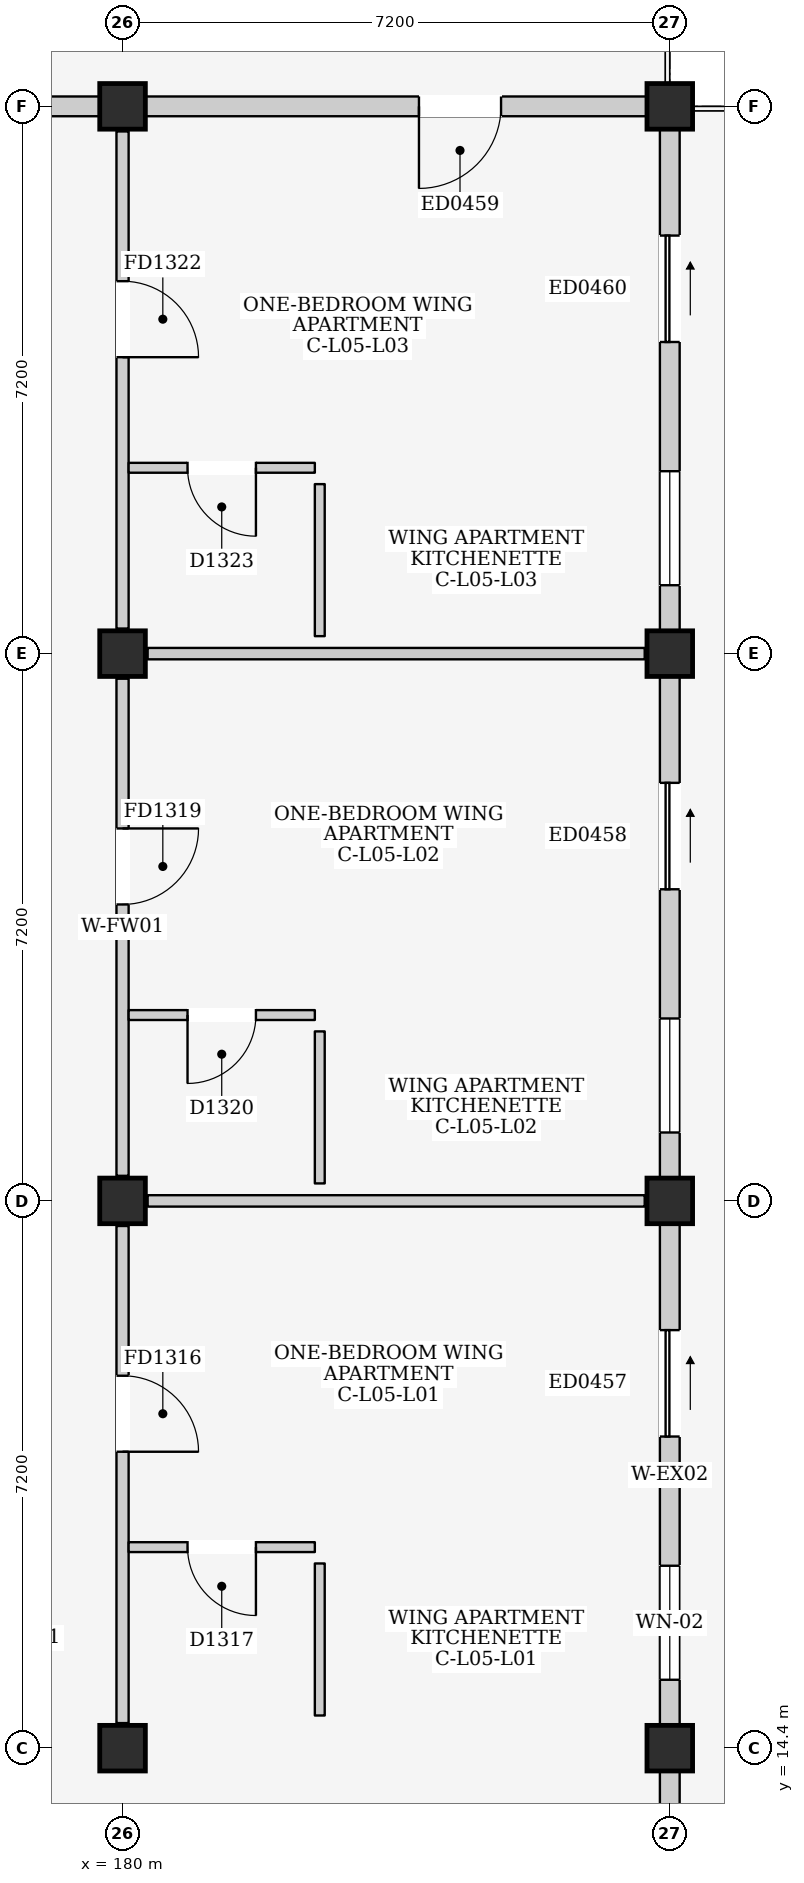
"""IFC4 building model, lengths in metres.
Left out: names, types, materials, properties, quantities, classifications, styles, units other than length and angle.
Written with IfcOpenShell. Run it as: python <this file> out.ifc"""

import sys

from ifc_helpers import new_model, si_unit, direction, frame, frame_2d, origin, origin_2d, place, context, subcontext, project, spatial, rectangle, extrude, element, fill, save


model = new_model("IFC4")
c1 = context("Model", 3, precision=1e-05, world=origin(), true_north=direction((0.0, 1.0)))
c2 = subcontext(c1, "Body", "Model", "MODEL_VIEW")
j1 = project(units=[si_unit("LENGTHUNIT", "METRE"), si_unit("PLANEANGLEUNIT", "RADIAN")], contexts=[c1])
p1 = place(None, origin())
s1 = spatial("IfcSite", under=j1, at=p1, CompositionType="ELEMENT")
p2 = place(p1, origin())
s2 = spatial("IfcBuilding", under=s1, at=p2, CompositionType="ELEMENT")
p3 = place(p2, frame((0.0, 0.0, 18.6)))
s3 = spatial("IfcBuildingStorey", under=s2, at=p3, CompositionType="ELEMENT", Elevation=18.6)
for number, where, z_axis, x_axis in (
    (1, (180.0, 14.4, 0.0), (0.0, 0.0, 1.0), (1.0, 0.0, 0.0)),
    (2, (180.0, 21.6, 0.0), (0.0, 0.0, 1.0), (1.0, 0.0, 0.0)),
    (3, (180.0, 28.8, 0.0), (0.0, 0.0, 1.0), (1.0, 0.0, 0.0)),
    (4, (180.0, 36.0, 0.0), (0.0, 0.0, 1.0), (1.0, 0.0, 0.0)),
    (5, (187.2, 14.4, 0.0), (0.0, 0.0, 1.0), (1.0, 0.0, 0.0)),
    (6, (187.2, 21.6, 0.0), (0.0, 0.0, 1.0), (1.0, 0.0, 0.0)),
    (7, (187.2, 28.8, 0.0), (0.0, 0.0, 1.0), (1.0, 0.0, 0.0)),
    (8, (187.2, 36.0, 0.0), (0.0, 0.0, 1.0), (1.0, 0.0, 0.0)),
):
    element("IfcColumn", number, at=place(p3, frame(where, z_axis=z_axis, x_axis=x_axis)), inside=s3, PredefinedType="COLUMN", context=c2, shape_type="SweptSolid", body=[
        extrude(rectangle(XDim=0.6, YDim=0.6, at=origin_2d()), origin(), (0.0, 0.0, 1.0), 3.3),
    ])
p4 = place(p3, frame((173.1, 36.0, 0.0), z_axis=(0.0, 0.0, 1.0), x_axis=(1.0, 0.0, 0.0)))
e9 = element("IfcWall", 9, at=p4, inside=s3, PredefinedType="ELEMENTEDWALL", context=c2, shape_type="SweptSolid", body=[
    extrude(rectangle(XDim=6.6, YDim=0.26, at=frame_2d((3.3, 0.0))), origin(), (0.0, 0.0, 1.0), 2.445),
])
p5 = place(p4, frame((2.8, 0.0, 1.1)))
e10 = element("IfcOpeningElement", 10, at=p5, cuts=e9, PredefinedType="OPENING", context=c2, shape_type="SweptSolid", body=[
    extrude(rectangle(XDim=1.0, YDim=0.9, at=frame_2d((0.5, 0.45))), frame((0.0, 0.145, 0.0), z_axis=(0.0, -1.0, 0.0), x_axis=(1.0, 0.0, 0.0)), (0.0, 0.0, 1.0), 0.29),
])
p6 = place(p3, frame((187.2, 7.5, 0.0), z_axis=(0.0, 0.0, 1.0), x_axis=(0.0, 1.0, 0.0)))
e11 = element("IfcWall", 11, at=p6, inside=s3, PredefinedType="ELEMENTEDWALL", context=c2, shape_type="SweptSolid", body=[
    extrude(rectangle(XDim=6.6, YDim=0.26, at=frame_2d((3.3, 0.0))), origin(), (0.0, 0.0, 1.0), 2.595),
])
p7 = place(p6, frame((3.65, 0.0, 0.0)))
e12 = element("IfcOpeningElement", 12, at=p7, cuts=e11, PredefinedType="OPENING", context=c2, shape_type="SweptSolid", body=[
    extrude(rectangle(XDim=1.4, YDim=2.1, at=frame_2d((0.7, 1.05))), frame((0.0, 0.145, 0.0), z_axis=(0.0, -1.0, 0.0), x_axis=(1.0, 0.0, 0.0)), (0.0, 0.0, 1.0), 0.29),
])
p8 = place(p3, frame((187.2, 14.7, 0.0), z_axis=(0.0, 0.0, 1.0), x_axis=(0.0, 1.0, 0.0)))
e13 = element("IfcWall", 13, at=p8, inside=s3, PredefinedType="ELEMENTEDWALL", context=c2, shape_type="SweptSolid", body=[
    extrude(rectangle(XDim=6.6, YDim=0.26, at=frame_2d((3.3, 0.0))), origin(), (0.0, 0.0, 1.0), 2.595),
])
p9 = place(p8, frame((3.8, 0.0, 0.0)))
e14 = element("IfcOpeningElement", 14, at=p9, cuts=e13, PredefinedType="OPENING", context=c2, shape_type="SweptSolid", body=[
    extrude(rectangle(XDim=1.4, YDim=2.1, at=frame_2d((0.7, 1.05))), frame((0.0, 0.145, 0.0), z_axis=(0.0, -1.0, 0.0), x_axis=(1.0, 0.0, 0.0)), (0.0, 0.0, 1.0), 0.29),
])
p10 = place(p8, frame((0.6, 0.0, 0.95)))
e15 = element("IfcOpeningElement", 15, at=p10, cuts=e13, PredefinedType="OPENING", context=c2, shape_type="SweptSolid", body=[
    extrude(rectangle(XDim=1.5, YDim=1.5, at=frame_2d((0.75, 0.75))), frame((0.0, 0.145, 0.0), z_axis=(0.0, -1.0, 0.0), x_axis=(1.0, 0.0, 0.0)), (0.0, 0.0, 1.0), 0.29),
])
p11 = place(p3, frame((187.2, 21.9, 0.0), z_axis=(0.0, 0.0, 1.0), x_axis=(0.0, 1.0, 0.0)))
e16 = element("IfcWall", 16, at=p11, inside=s3, PredefinedType="ELEMENTEDWALL", context=c2, shape_type="SweptSolid", body=[
    extrude(rectangle(XDim=6.6, YDim=0.26, at=frame_2d((3.3, 0.0))), origin(), (0.0, 0.0, 1.0), 2.595),
])
p12 = place(p11, frame((3.8, 0.0, 0.0)))
e17 = element("IfcOpeningElement", 17, at=p12, cuts=e16, PredefinedType="OPENING", context=c2, shape_type="SweptSolid", body=[
    extrude(rectangle(XDim=1.4, YDim=2.1, at=frame_2d((0.7, 1.05))), frame((0.0, 0.145, 0.0), z_axis=(0.0, -1.0, 0.0), x_axis=(1.0, 0.0, 0.0)), (0.0, 0.0, 1.0), 0.29),
])
p13 = place(p11, frame((0.6, 0.0, 0.95)))
e18 = element("IfcOpeningElement", 18, at=p13, cuts=e16, PredefinedType="OPENING", context=c2, shape_type="SweptSolid", body=[
    extrude(rectangle(XDim=1.5, YDim=1.5, at=frame_2d((0.75, 0.75))), frame((0.0, 0.145, 0.0), z_axis=(0.0, -1.0, 0.0), x_axis=(1.0, 0.0, 0.0)), (0.0, 0.0, 1.0), 0.29),
])
p14 = place(p3, frame((180.3, 36.0, 0.0), z_axis=(0.0, 0.0, 1.0), x_axis=(1.0, 0.0, 0.0)))
e19 = element("IfcWall", 19, at=p14, inside=s3, PredefinedType="ELEMENTEDWALL", context=c2, shape_type="SweptSolid", body=[
    extrude(rectangle(XDim=6.6, YDim=0.26, at=frame_2d((3.3, 0.0))), origin(), (0.0, 0.0, 1.0), 2.445),
])
p15 = place(p14, frame((3.6, 0.0, 0.0)))
e20 = element("IfcOpeningElement", 20, at=p15, cuts=e19, PredefinedType="OPENING", context=c2, shape_type="SweptSolid", body=[
    extrude(rectangle(XDim=1.08, YDim=2.12, at=frame_2d((0.54, 1.06))), frame((0.0, 0.145, 0.0), z_axis=(0.0, -1.0, 0.0), x_axis=(1.0, 0.0, 0.0)), (0.0, 0.0, 1.0), 0.29),
])
p16 = place(p3, frame((187.2, 29.1, 0.0), z_axis=(0.0, 0.0, 1.0), x_axis=(0.0, 1.0, 0.0)))
e21 = element("IfcWall", 21, at=p16, inside=s3, PredefinedType="ELEMENTEDWALL", context=c2, shape_type="SweptSolid", body=[
    extrude(rectangle(XDim=6.6, YDim=0.26, at=frame_2d((3.3, 0.0))), origin(), (0.0, 0.0, 1.0), 2.595),
])
p17 = place(p16, frame((3.8, 0.0, 0.0)))
e22 = element("IfcOpeningElement", 22, at=p17, cuts=e21, PredefinedType="OPENING", context=c2, shape_type="SweptSolid", body=[
    extrude(rectangle(XDim=1.4, YDim=2.1, at=frame_2d((0.7, 1.05))), frame((0.0, 0.145, 0.0), z_axis=(0.0, -1.0, 0.0), x_axis=(1.0, 0.0, 0.0)), (0.0, 0.0, 1.0), 0.29),
])
p18 = place(p16, frame((0.6, 0.0, 0.95)))
e23 = element("IfcOpeningElement", 23, at=p18, cuts=e21, PredefinedType="OPENING", context=c2, shape_type="SweptSolid", body=[
    extrude(rectangle(XDim=1.5, YDim=1.5, at=frame_2d((0.75, 0.75))), frame((0.0, 0.145, 0.0), z_axis=(0.0, -1.0, 0.0), x_axis=(1.0, 0.0, 0.0)), (0.0, 0.0, 1.0), 0.29),
])
p19 = place(p3, frame((180.0, 14.73, 0.0), z_axis=(0.0, 0.0, 1.0), x_axis=(0.0, 1.0, 0.0)))
e24 = element("IfcWall", 24, at=p19, inside=s3, PredefinedType="PARTITIONING", context=c2, shape_type="SweptSolid", body=[
    extrude(rectangle(XDim=6.54, YDim=0.16, at=frame_2d((3.27, 0.0))), origin(), (0.0, 0.0, 1.0), 2.545),
])
p20 = place(p19, frame((3.57, 0.0, 0.0)))
e25 = element("IfcOpeningElement", 25, at=p20, cuts=e24, PredefinedType="OPENING", context=c2, shape_type="SweptSolid", body=[
    extrude(rectangle(XDim=1.0, YDim=2.15, at=frame_2d((0.5, 1.075))), frame((0.0, 0.095, 0.0), z_axis=(0.0, -1.0, 0.0), x_axis=(1.0, 0.0, 0.0)), (0.0, 0.0, 1.0), 0.19),
])
p21 = place(p3, frame((180.33, 21.6, 0.0), z_axis=(0.0, 0.0, 1.0), x_axis=(1.0, 0.0, 0.0)))
e26 = element("IfcWall", 26, at=p21, inside=s3, PredefinedType="PARTITIONING", context=c2, shape_type="SweptSolid", body=[
    extrude(rectangle(XDim=6.54, YDim=0.15, at=frame_2d((3.27, 0.0))), origin(), (0.0, 0.0, 1.0), 2.445),
])
p22 = place(p3, frame((180.08, 17.045, 0.0), z_axis=(0.0, 0.0, 1.0), x_axis=(1.0, 0.0, 0.0)))
e27 = element("IfcWall", 27, at=p22, inside=s3, PredefinedType="PARTITIONING", context=c2, shape_type="SweptSolid", body=[
    extrude(rectangle(XDim=2.45, YDim=0.13, at=frame_2d((1.225, 0.0))), origin(), (0.0, 0.0, 1.0), 3.06),
])
p23 = place(p22, frame((0.775, 0.0, 0.0)))
e28 = element("IfcOpeningElement", 28, at=p23, cuts=e27, PredefinedType="OPENING", context=c2, shape_type="SweptSolid", body=[
    extrude(rectangle(XDim=0.9, YDim=2.1, at=frame_2d((0.45, 1.05))), frame((0.0, 0.08, 0.0), z_axis=(0.0, -1.0, 0.0), x_axis=(1.0, 0.0, 0.0)), (0.0, 0.0, 1.0), 0.16),
])
p24 = place(p3, frame((182.595, 14.83, 0.0), z_axis=(0.0, 0.0, 1.0), x_axis=(0.0, 1.0, 0.0)))
e29 = element("IfcWall", 29, at=p24, inside=s3, PredefinedType="PARTITIONING", context=c2, shape_type="SweptSolid", body=[
    extrude(rectangle(XDim=2.0, YDim=0.13, at=frame_2d((1.0, 0.0))), origin(), (0.0, 0.0, 1.0), 3.06),
])
p25 = place(p3, frame((180.0, 21.93, 0.0), z_axis=(0.0, 0.0, 1.0), x_axis=(0.0, 1.0, 0.0)))
e30 = element("IfcWall", 30, at=p25, inside=s3, PredefinedType="PARTITIONING", context=c2, shape_type="SweptSolid", body=[
    extrude(rectangle(XDim=6.54, YDim=0.16, at=frame_2d((3.27, 0.0))), origin(), (0.0, 0.0, 1.0), 2.545),
])
p26 = place(p25, frame((3.57, 0.0, 0.0)))
e31 = element("IfcOpeningElement", 31, at=p26, cuts=e30, PredefinedType="OPENING", context=c2, shape_type="SweptSolid", body=[
    extrude(rectangle(XDim=1.0, YDim=2.15, at=frame_2d((0.5, 1.075))), frame((0.0, 0.095, 0.0), z_axis=(0.0, -1.0, 0.0), x_axis=(1.0, 0.0, 0.0)), (0.0, 0.0, 1.0), 0.19),
])
p27 = place(p3, frame((180.33, 28.8, 0.0), z_axis=(0.0, 0.0, 1.0), x_axis=(1.0, 0.0, 0.0)))
e32 = element("IfcWall", 32, at=p27, inside=s3, PredefinedType="PARTITIONING", context=c2, shape_type="SweptSolid", body=[
    extrude(rectangle(XDim=6.54, YDim=0.15, at=frame_2d((3.27, 0.0))), origin(), (0.0, 0.0, 1.0), 2.445),
])
p28 = place(p3, frame((180.08, 24.045, 0.0), z_axis=(0.0, 0.0, 1.0), x_axis=(1.0, 0.0, 0.0)))
e33 = element("IfcWall", 33, at=p28, inside=s3, PredefinedType="PARTITIONING", context=c2, shape_type="SweptSolid", body=[
    extrude(rectangle(XDim=2.45, YDim=0.13, at=frame_2d((1.225, 0.0))), origin(), (0.0, 0.0, 1.0), 3.06),
])
p29 = place(p28, frame((0.775, 0.0, 0.0)))
e34 = element("IfcOpeningElement", 34, at=p29, cuts=e33, PredefinedType="OPENING", context=c2, shape_type="SweptSolid", body=[
    extrude(rectangle(XDim=0.9, YDim=2.1, at=frame_2d((0.45, 1.05))), frame((0.0, 0.08, 0.0), z_axis=(0.0, -1.0, 0.0), x_axis=(1.0, 0.0, 0.0)), (0.0, 0.0, 1.0), 0.16),
])
p30 = place(p3, frame((182.595, 21.83, 0.0), z_axis=(0.0, 0.0, 1.0), x_axis=(0.0, 1.0, 0.0)))
e35 = element("IfcWall", 35, at=p30, inside=s3, PredefinedType="PARTITIONING", context=c2, shape_type="SweptSolid", body=[
    extrude(rectangle(XDim=2.0, YDim=0.13, at=frame_2d((1.0, 0.0))), origin(), (0.0, 0.0, 1.0), 3.06),
])
p31 = place(p3, frame((180.0, 29.13, 0.0), z_axis=(0.0, 0.0, 1.0), x_axis=(0.0, 1.0, 0.0)))
e36 = element("IfcWall", 36, at=p31, inside=s3, PredefinedType="PARTITIONING", context=c2, shape_type="SweptSolid", body=[
    extrude(rectangle(XDim=6.54, YDim=0.16, at=frame_2d((3.27, 0.0))), origin(), (0.0, 0.0, 1.0), 2.545),
])
p32 = place(p31, frame((3.57, 0.0, 0.0)))
e37 = element("IfcOpeningElement", 37, at=p32, cuts=e36, PredefinedType="OPENING", context=c2, shape_type="SweptSolid", body=[
    extrude(rectangle(XDim=1.0, YDim=2.15, at=frame_2d((0.5, 1.075))), frame((0.0, 0.095, 0.0), z_axis=(0.0, -1.0, 0.0), x_axis=(1.0, 0.0, 0.0)), (0.0, 0.0, 1.0), 0.19),
])
p33 = place(p3, frame((180.08, 31.245, 0.0), z_axis=(0.0, 0.0, 1.0), x_axis=(1.0, 0.0, 0.0)))
e38 = element("IfcWall", 38, at=p33, inside=s3, PredefinedType="PARTITIONING", context=c2, shape_type="SweptSolid", body=[
    extrude(rectangle(XDim=2.45, YDim=0.13, at=frame_2d((1.225, 0.0))), origin(), (0.0, 0.0, 1.0), 3.06),
])
p34 = place(p33, frame((0.775, 0.0, 0.0)))
e39 = element("IfcOpeningElement", 39, at=p34, cuts=e38, PredefinedType="OPENING", context=c2, shape_type="SweptSolid", body=[
    extrude(rectangle(XDim=0.9, YDim=2.1, at=frame_2d((0.45, 1.05))), frame((0.0, 0.08, 0.0), z_axis=(0.0, -1.0, 0.0), x_axis=(1.0, 0.0, 0.0)), (0.0, 0.0, 1.0), 0.16),
])
p35 = place(p3, frame((182.595, 29.03, 0.0), z_axis=(0.0, 0.0, 1.0), x_axis=(0.0, 1.0, 0.0)))
e40 = element("IfcWall", 40, at=p35, inside=s3, PredefinedType="PARTITIONING", context=c2, shape_type="SweptSolid", body=[
    extrude(rectangle(XDim=2.0, YDim=0.13, at=frame_2d((1.0, 0.0))), origin(), (0.0, 0.0, 1.0), 3.06),
])
p36 = place(p9, frame((1.4, 0.0, 0.0), z_axis=(0.0, 0.0, 1.0), x_axis=(-1.0, 0.0, 0.0)))
e41 = element("IfcDoor", 41, at=p36, inside=s3, OperationType="SLIDING_TO_RIGHT", PredefinedType="DOOR", context=c2, shape_type="SweptSolid", body=[
    extrude(rectangle(XDim=1.4, YDim=2.1, at=frame_2d((0.7, 1.05))), frame((0.0, 0.025, 0.0), z_axis=(0.0, -1.0, 0.0), x_axis=(1.0, 0.0, 0.0)), (0.0, 0.0, 1.0), 0.05),
])
fill(e14, e41)
p37 = place(p10, origin())
e42 = element("IfcWindow", 42, at=p37, inside=s3, PartitioningType="DOUBLE_PANEL_VERTICAL", PredefinedType="WINDOW", context=c2, shape_type="SweptSolid", body=[
    extrude(rectangle(XDim=1.5, YDim=1.5, at=frame_2d((0.75, 0.75))), frame((0.0, 0.03, 0.0), z_axis=(0.0, -1.0, 0.0), x_axis=(1.0, 0.0, 0.0)), (0.0, 0.0, 1.0), 0.06),
])
fill(e15, e42)
p38 = place(p12, frame((1.4, 0.0, 0.0), z_axis=(0.0, 0.0, 1.0), x_axis=(-1.0, 0.0, 0.0)))
e43 = element("IfcDoor", 43, at=p38, inside=s3, OperationType="SLIDING_TO_RIGHT", PredefinedType="DOOR", context=c2, shape_type="SweptSolid", body=[
    extrude(rectangle(XDim=1.4, YDim=2.1, at=frame_2d((0.7, 1.05))), frame((0.0, 0.025, 0.0), z_axis=(0.0, -1.0, 0.0), x_axis=(1.0, 0.0, 0.0)), (0.0, 0.0, 1.0), 0.05),
])
fill(e17, e43)
p39 = place(p13, origin())
e44 = element("IfcWindow", 44, at=p39, inside=s3, PartitioningType="DOUBLE_PANEL_VERTICAL", PredefinedType="WINDOW", context=c2, shape_type="SweptSolid", body=[
    extrude(rectangle(XDim=1.5, YDim=1.5, at=frame_2d((0.75, 0.75))), frame((0.0, 0.03, 0.0), z_axis=(0.0, -1.0, 0.0), x_axis=(1.0, 0.0, 0.0)), (0.0, 0.0, 1.0), 0.06),
])
fill(e18, e44)
p40 = place(p15, frame((1.08, 0.0, 0.0), z_axis=(0.0, 0.0, 1.0), x_axis=(-1.0, 0.0, 0.0)))
e45 = element("IfcDoor", 45, at=p40, inside=s3, OperationType="SINGLE_SWING_RIGHT", PredefinedType="DOOR", context=c2, shape_type="SweptSolid", body=[
    extrude(rectangle(XDim=1.08, YDim=2.12, at=frame_2d((0.54, 1.06))), frame((0.0, 0.025, 0.0), z_axis=(0.0, -1.0, 0.0), x_axis=(1.0, 0.0, 0.0)), (0.0, 0.0, 1.0), 0.05),
])
fill(e20, e45)
p41 = place(p17, frame((1.4, 0.0, 0.0), z_axis=(0.0, 0.0, 1.0), x_axis=(-1.0, 0.0, 0.0)))
e46 = element("IfcDoor", 46, at=p41, inside=s3, OperationType="SLIDING_TO_RIGHT", PredefinedType="DOOR", context=c2, shape_type="SweptSolid", body=[
    extrude(rectangle(XDim=1.4, YDim=2.1, at=frame_2d((0.7, 1.05))), frame((0.0, 0.025, 0.0), z_axis=(0.0, -1.0, 0.0), x_axis=(1.0, 0.0, 0.0)), (0.0, 0.0, 1.0), 0.05),
])
fill(e22, e46)
p42 = place(p18, origin())
e47 = element("IfcWindow", 47, at=p42, inside=s3, PartitioningType="DOUBLE_PANEL_VERTICAL", PredefinedType="WINDOW", context=c2, shape_type="SweptSolid", body=[
    extrude(rectangle(XDim=1.5, YDim=1.5, at=frame_2d((0.75, 0.75))), frame((0.0, 0.03, 0.0), z_axis=(0.0, -1.0, 0.0), x_axis=(1.0, 0.0, 0.0)), (0.0, 0.0, 1.0), 0.06),
])
fill(e23, e47)
p43 = place(p20, frame((1.0, 0.0, 0.0), z_axis=(0.0, 0.0, 1.0), x_axis=(-1.0, 0.0, 0.0)))
e48 = element("IfcDoor", 48, at=p43, inside=s3, OperationType="SINGLE_SWING_RIGHT", PredefinedType="DOOR", context=c2, shape_type="SweptSolid", body=[
    extrude(rectangle(XDim=1.0, YDim=2.15, at=frame_2d((0.5, 1.075))), frame((0.0, 0.025, 0.0), z_axis=(0.0, -1.0, 0.0), x_axis=(1.0, 0.0, 0.0)), (0.0, 0.0, 1.0), 0.05),
])
fill(e25, e48)
p44 = place(p23, frame((0.9, 0.0, 0.0), z_axis=(0.0, 0.0, 1.0), x_axis=(-1.0, 0.0, 0.0)))
e49 = element("IfcDoor", 49, at=p44, inside=s3, OperationType="SINGLE_SWING_LEFT", PredefinedType="DOOR", context=c2, shape_type="SweptSolid", body=[
    extrude(rectangle(XDim=0.9, YDim=2.1, at=frame_2d((0.45, 1.05))), frame((0.0, 0.025, 0.0), z_axis=(0.0, -1.0, 0.0), x_axis=(1.0, 0.0, 0.0)), (0.0, 0.0, 1.0), 0.05),
])
fill(e28, e49)
p45 = place(p26, frame((1.0, 0.0, 0.0), z_axis=(0.0, 0.0, 1.0), x_axis=(-1.0, 0.0, 0.0)))
e50 = element("IfcDoor", 50, at=p45, inside=s3, OperationType="SINGLE_SWING_LEFT", PredefinedType="DOOR", context=c2, shape_type="SweptSolid", body=[
    extrude(rectangle(XDim=1.0, YDim=2.15, at=frame_2d((0.5, 1.075))), frame((0.0, 0.025, 0.0), z_axis=(0.0, -1.0, 0.0), x_axis=(1.0, 0.0, 0.0)), (0.0, 0.0, 1.0), 0.05),
])
fill(e31, e50)
p46 = place(p29, frame((0.9, 0.0, 0.0), z_axis=(0.0, 0.0, 1.0), x_axis=(-1.0, 0.0, 0.0)))
e51 = element("IfcDoor", 51, at=p46, inside=s3, OperationType="SINGLE_SWING_RIGHT", PredefinedType="DOOR", context=c2, shape_type="SweptSolid", body=[
    extrude(rectangle(XDim=0.9, YDim=2.1, at=frame_2d((0.45, 1.05))), frame((0.0, 0.025, 0.0), z_axis=(0.0, -1.0, 0.0), x_axis=(1.0, 0.0, 0.0)), (0.0, 0.0, 1.0), 0.05),
])
fill(e34, e51)
p47 = place(p32, frame((1.0, 0.0, 0.0), z_axis=(0.0, 0.0, 1.0), x_axis=(-1.0, 0.0, 0.0)))
e52 = element("IfcDoor", 52, at=p47, inside=s3, OperationType="SINGLE_SWING_RIGHT", PredefinedType="DOOR", context=c2, shape_type="SweptSolid", body=[
    extrude(rectangle(XDim=1.0, YDim=2.15, at=frame_2d((0.5, 1.075))), frame((0.0, 0.025, 0.0), z_axis=(0.0, -1.0, 0.0), x_axis=(1.0, 0.0, 0.0)), (0.0, 0.0, 1.0), 0.05),
])
fill(e37, e52)
p48 = place(p34, frame((0.9, 0.0, 0.0), z_axis=(0.0, 0.0, 1.0), x_axis=(-1.0, 0.0, 0.0)))
e53 = element("IfcDoor", 53, at=p48, inside=s3, OperationType="SINGLE_SWING_LEFT", PredefinedType="DOOR", context=c2, shape_type="SweptSolid", body=[
    extrude(rectangle(XDim=0.9, YDim=2.1, at=frame_2d((0.45, 1.05))), frame((0.0, 0.025, 0.0), z_axis=(0.0, -1.0, 0.0), x_axis=(1.0, 0.0, 0.0)), (0.0, 0.0, 1.0), 0.05),
])
fill(e39, e53)
save(model, sys.argv[1])
